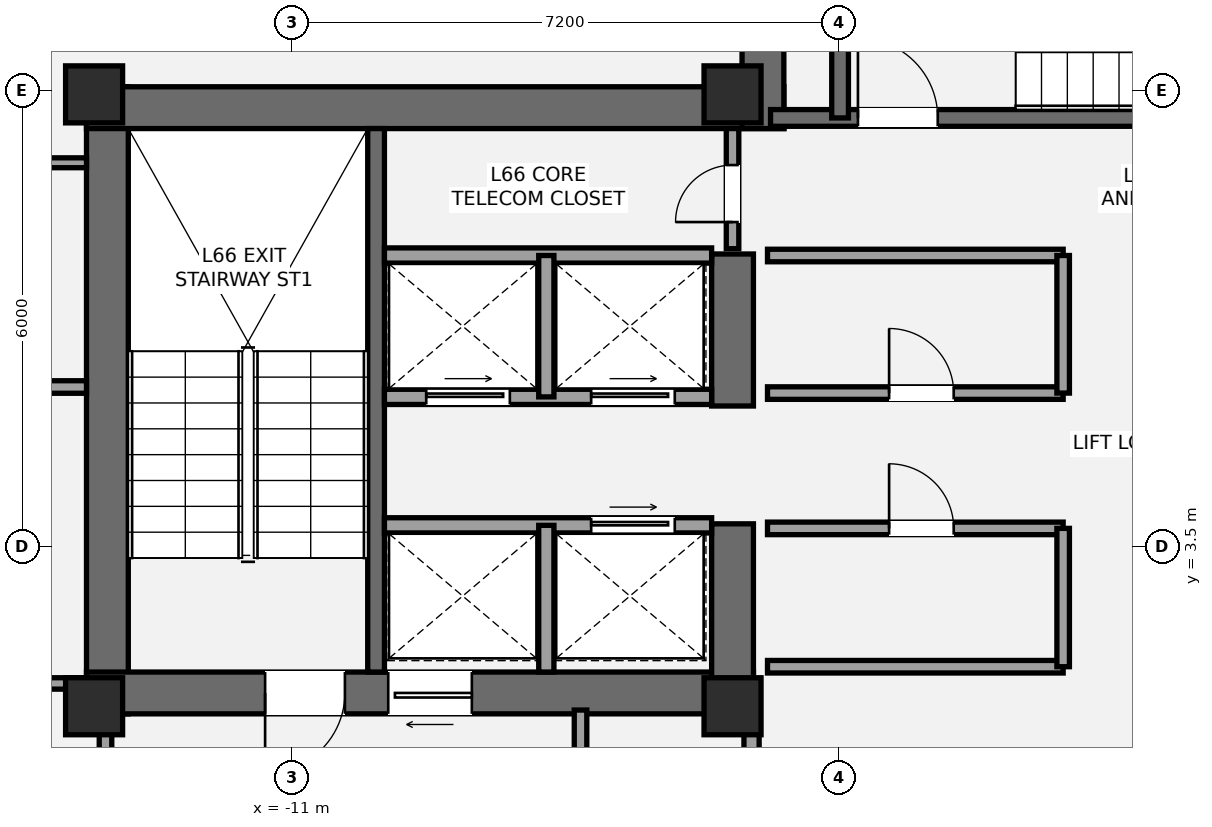
"""IFC4 building model, lengths in metres.
Left out: names, types, materials, properties, quantities, classifications, styles, units other than length and angle.
Written with IfcOpenShell. Run it as: python <this file> out.ifc"""

import sys

from ifc_helpers import new_model, si_unit, direction, frame, frame_2d, origin, origin_2d, place, context, subcontext, project, spatial, rectangle, extrude, element, fill, save


model = new_model("IFC4")
c1 = context("Model", 3, precision=1e-05, world=origin(), true_north=direction((0.0, 1.0)))
c2 = subcontext(c1, "Body", "Model", "MODEL_VIEW")
j1 = project(units=[si_unit("LENGTHUNIT", "METRE"), si_unit("PLANEANGLEUNIT", "RADIAN")], contexts=[c1])
p1 = place(None, origin())
s1 = spatial("IfcSite", under=j1, at=p1, CompositionType="ELEMENT")
p2 = place(p1, origin())
s2 = spatial("IfcBuilding", under=s1, at=p2, CompositionType="ELEMENT")
p3 = place(p2, frame((0.0, 0.0, 235.2)))
s3 = spatial("IfcBuildingStorey", under=s2, at=p3, CompositionType="ELEMENT", Elevation=235.2)
p4 = place(p3, frame((-13.425, 1.3, 0.0), z_axis=(0.0, 0.0, 1.0), x_axis=(0.0, 1.0, 0.0)))
e1 = element("IfcWall", 1, at=p4, inside=s3, PredefinedType="SHEAR", context=c2, shape_type="SweptSolid", body=[
    extrude(rectangle(XDim=8.25, YDim=0.55, at=frame_2d((4.125, 0.0))), origin(), (0.0, 0.0, 1.0), 3.15),
])
p5 = place(p3, frame((-13.7, 9.275, 0.0), z_axis=(0.0, 0.0, 1.0), x_axis=(1.0, 0.0, 0.0)))
e2 = element("IfcWall", 2, at=p5, inside=s3, PredefinedType="SHEAR", context=c2, shape_type="SweptSolid", body=[
    extrude(rectangle(XDim=9.175, YDim=0.55, at=frame_2d((4.587, 0.0))), origin(), (0.0, 0.0, 1.0), 3.15),
])
p6 = place(p3, frame((-4.925, 1.575, 0.0), z_axis=(0.0, 0.0, 1.0), x_axis=(-1.0, 0.0, 0.0)))
e3 = element("IfcWall", 3, at=p6, inside=s3, PredefinedType="SHEAR", context=c2, shape_type="SweptSolid", body=[
    extrude(rectangle(XDim=8.775, YDim=0.55, at=frame_2d((4.387, 0.0))), origin(), (0.0, 0.0, 1.0), 3.15),
])
p7 = place(p6, frame((5.375, 0.0, 0.0)))
e4 = element("IfcOpeningElement", 4, at=p7, cuts=e3, PredefinedType="OPENING", context=c2, shape_type="SweptSolid", body=[
    extrude(rectangle(XDim=1.05, YDim=2.15, at=frame_2d((0.525, 1.075))), frame((0.0, 0.285, 0.0), z_axis=(0.0, -1.0, 0.0), x_axis=(1.0, 0.0, 0.0)), (0.0, 0.0, 1.0), 0.57),
])
p8 = place(p6, frame((3.705, 0.0, 0.0)))
e5 = element("IfcOpeningElement", 5, at=p8, cuts=e3, PredefinedType="OPENING", context=c2, shape_type="SweptSolid", body=[
    extrude(rectangle(XDim=1.1, YDim=2.2, at=frame_2d((0.55, 1.1))), frame((0.0, 0.285, 0.0), z_axis=(0.0, -1.0, 0.0), x_axis=(1.0, 0.0, 0.0)), (0.0, 0.0, 1.0), 0.57),
])
p9 = place(p3, frame((-5.2, 1.3, 0.0), z_axis=(0.0, 0.0, 1.0), x_axis=(0.0, 1.0, 0.0)))
e6 = element("IfcWall", 6, at=p9, inside=s3, PredefinedType="SHEAR", context=c2, shape_type="SweptSolid", body=[
    extrude(rectangle(XDim=2.5, YDim=0.55, at=frame_2d((1.25, 0.0))), origin(), (0.0, 0.0, 1.0), 3.15),
])
p10 = place(p3, frame((-5.2, 5.35, 0.0), z_axis=(0.0, 0.0, 1.0), x_axis=(0.0, 1.0, 0.0)))
e7 = element("IfcWall", 7, at=p10, inside=s3, PredefinedType="SHEAR", context=c2, shape_type="SweptSolid", body=[
    extrude(rectangle(XDim=2.0, YDim=0.55, at=frame_2d((1.0, 0.0))), origin(), (0.0, 0.0, 1.0), 3.15),
])
p11 = place(p3, frame((-9.89, 1.85, 0.0), z_axis=(0.0, 0.0, 1.0), x_axis=(0.0, 1.0, 0.0)))
e8 = element("IfcWall", 8, at=p11, inside=s3, PredefinedType="SHEAR", context=c2, shape_type="SweptSolid", body=[
    extrude(rectangle(XDim=7.15, YDim=0.22, at=frame_2d((3.575, 0.0))), origin(), (0.0, 0.0, 1.0), 3.15),
])
p12 = place(p3, frame((-4.8, 9.0, 0.0), z_axis=(0.0, 0.0, 1.0), x_axis=(0.0, 1.0, 0.0)))
e9 = element("IfcWall", 9, at=p12, inside=s3, PredefinedType="SHEAR", context=c2, shape_type="SweptSolid", body=[
    extrude(rectangle(XDim=3.95, YDim=0.55, at=frame_2d((1.975, 0.0))), origin(), (0.0, 0.0, 1.0), 3.15),
])
p13 = place(p3, frame((-4.7, 9.14, 0.0), z_axis=(0.0, 0.0, 1.0), x_axis=(1.0, 0.0, 0.0)))
e10 = element("IfcWall", 10, at=p13, inside=s3, PredefinedType="SHEAR", context=c2, shape_type="SweptSolid", body=[
    extrude(rectangle(XDim=9.3, YDim=0.22, at=frame_2d((4.65, 0.0))), origin(), (0.0, 0.0, 1.0), 3.15),
])
p14 = place(p13, frame((1.15, 0.0, 0.0)))
e11 = element("IfcOpeningElement", 11, at=p14, cuts=e10, PredefinedType="OPENING", context=c2, shape_type="SweptSolid", body=[
    extrude(rectangle(XDim=1.05, YDim=2.15, at=frame_2d((0.525, 1.075))), frame((0.0, 0.12, 0.0), z_axis=(0.0, -1.0, 0.0), x_axis=(1.0, 0.0, 0.0)), (0.0, 0.0, 1.0), 0.24),
])
p15 = place(p3, frame((-3.785, 9.14, 0.0), z_axis=(0.0, 0.0, 1.0), x_axis=(0.0, 1.0, 0.0)))
e12 = element("IfcWall", 12, at=p15, inside=s3, PredefinedType="SHEAR", context=c2, shape_type="SweptSolid", body=[
    extrude(rectangle(XDim=3.26, YDim=0.22, at=frame_2d((1.63, 0.0))), origin(), (0.0, 0.0, 1.0), 3.15),
])
for number, where, z_axis, x_axis in (
    (13, (-13.6, 1.4, 0.0), (0.0, 0.0, 1.0), (1.0, 0.0, 0.0)),
    (14, (-13.6, 9.45, 0.0), (0.0, 0.0, 1.0), (1.0, 0.0, 0.0)),
    (15, (-5.2, 1.4, 0.0), (0.0, 0.0, 1.0), (1.0, 0.0, 0.0)),
    (16, (-5.2, 9.45, 0.0), (0.0, 0.0, 1.0), (1.0, 0.0, 0.0)),
):
    element("IfcColumn", number, at=place(p3, frame(where, z_axis=z_axis, x_axis=x_axis)), inside=s3, PredefinedType="PILASTER", context=c2, shape_type="SweptSolid", body=[
        extrude(rectangle(XDim=0.75, YDim=0.75, at=origin_2d()), origin(), (0.0, 0.0, 1.0), 3.15),
    ])
p16 = place(p3, frame((-17.381, 9.559, 0.0), z_axis=(0.0, 0.0, 1.0), x_axis=(0.827637036896, 0.561263694851, 0.0)))
e17 = element("IfcWall", 17, at=p16, inside=s3, PredefinedType="STANDARD", context=c2, shape_type="SweptSolid", body=[
    extrude(rectangle(XDim=3.793, YDim=0.44, at=frame_2d((1.896, 0.0))), origin(), (0.0, 0.0, 1.0), 2.336),
])
p17 = place(p16, frame((1.544, 0.0, 0.55)))
e18 = element("IfcOpeningElement", 18, at=p17, cuts=e17, PredefinedType="OPENING", context=c2, shape_type="SweptSolid", body=[
    extrude(rectangle(XDim=1.75, YDim=1.55, at=frame_2d((0.875, 0.775))), frame((0.0, 0.23, 0.0), z_axis=(0.0, -1.0, 0.0), x_axis=(1.0, 0.0, 0.0)), (0.0, 0.0, 1.0), 0.46),
])
p18 = place(p3, frame((-13.45, -2.15, 0.0), z_axis=(0.0, 0.0, 1.0), x_axis=(0.0, 1.0, 0.0)))
e19 = element("IfcWall", 19, at=p18, inside=s3, PredefinedType="PARTITIONING", context=c2, shape_type="SweptSolid", body=[
    extrude(rectangle(XDim=3.5, YDim=0.165, at=frame_2d((1.75, 0.0))), origin(), (0.0, 0.0, 1.0), 2.423),
])
p19 = place(p18, frame((0.67, 0.0, 0.0)))
e20 = element("IfcOpeningElement", 20, at=p19, cuts=e19, PredefinedType="OPENING", context=c2, shape_type="SweptSolid", body=[
    extrude(rectangle(XDim=1.05, YDim=2.15, at=frame_2d((0.525, 1.075))), frame((0.0, 0.093, 0.0), z_axis=(0.0, -1.0, 0.0), x_axis=(1.0, 0.0, 0.0)), (0.0, 0.0, 1.0), 0.185),
])
p20 = place(p3, frame((-7.2, -2.15, 0.0), z_axis=(0.0, 0.0, 1.0), x_axis=(0.0, 1.0, 0.0)))
e21 = element("IfcWall", 21, at=p20, inside=s3, PredefinedType="PARTITIONING", context=c2, shape_type="SweptSolid", body=[
    extrude(rectangle(XDim=3.5, YDim=0.165, at=frame_2d((1.75, 0.0))), origin(), (0.0, 0.0, 1.0), 2.423),
])
p21 = place(p3, frame((-4.95, -2.15, 0.0), z_axis=(0.0, 0.0, 1.0), x_axis=(0.0, 1.0, 0.0)))
e22 = element("IfcWall", 22, at=p21, inside=s3, PredefinedType="SOLIDWALL", context=c2, shape_type="SweptSolid", body=[
    extrude(rectangle(XDim=3.5, YDim=0.2, at=frame_2d((1.75, 0.0))), origin(), (0.0, 0.0, 1.0), 2.423),
])
p22 = place(p21, frame((0.95, 0.0, 0.0)))
e23 = element("IfcOpeningElement", 23, at=p22, cuts=e22, PredefinedType="OPENING", context=c2, shape_type="SweptSolid", body=[
    extrude(rectangle(XDim=0.75, YDim=2.1, at=frame_2d((0.375, 1.05))), frame((0.0, 0.11, 0.0), z_axis=(0.0, -1.0, 0.0), x_axis=(1.0, 0.0, 0.0)), (0.0, 0.0, 1.0), 0.22),
])
p23 = place(p3, frame((-9.78, 3.78, 0.0), z_axis=(0.0, 0.0, 1.0), x_axis=(1.0, 0.0, 0.0)))
e24 = element("IfcWall", 24, at=p23, inside=s3, PredefinedType="SOLIDWALL", context=c2, shape_type="SweptSolid", body=[
    extrude(rectangle(XDim=4.305, YDim=0.2, at=frame_2d((2.152, 0.0))), origin(), (0.0, 0.0, 1.0), 2.97),
])
p24 = place(p23, frame((2.72, 0.0, 0.0)))
e25 = element("IfcOpeningElement", 25, at=p24, cuts=e24, PredefinedType="OPENING", context=c2, shape_type="SweptSolid", body=[
    extrude(rectangle(XDim=1.1, YDim=2.2, at=frame_2d((0.55, 1.1))), frame((0.0, 0.11, 0.0), z_axis=(0.0, -1.0, 0.0), x_axis=(1.0, 0.0, 0.0)), (0.0, 0.0, 1.0), 0.22),
])
p25 = place(p3, frame((-7.65, 1.85, 0.0), z_axis=(0.0, 0.0, 1.0), x_axis=(0.0, 1.0, 0.0)))
e26 = element("IfcWall", 26, at=p25, inside=s3, PredefinedType="SOLIDWALL", context=c2, shape_type="SweptSolid", body=[
    extrude(rectangle(XDim=1.93, YDim=0.2, at=frame_2d((0.965, 0.0))), origin(), (0.0, 0.0, 1.0), 2.97),
])
p26 = place(p3, frame((-9.78, 5.47, 0.0), z_axis=(0.0, 0.0, 1.0), x_axis=(1.0, 0.0, 0.0)))
e27 = element("IfcWall", 27, at=p26, inside=s3, PredefinedType="SOLIDWALL", context=c2, shape_type="SweptSolid", body=[
    extrude(rectangle(XDim=4.305, YDim=0.2, at=frame_2d((2.152, 0.0))), origin(), (0.0, 0.0, 1.0), 2.97),
])
p27 = place(p26, frame((0.55, 0.0, 0.0)))
e28 = element("IfcOpeningElement", 28, at=p27, cuts=e27, PredefinedType="OPENING", context=c2, shape_type="SweptSolid", body=[
    extrude(rectangle(XDim=1.1, YDim=2.2, at=frame_2d((0.55, 1.1))), frame((0.0, 0.11, 0.0), z_axis=(0.0, -1.0, 0.0), x_axis=(1.0, 0.0, 0.0)), (0.0, 0.0, 1.0), 0.22),
])
p28 = place(p26, frame((2.72, 0.0, 0.0)))
e29 = element("IfcOpeningElement", 29, at=p28, cuts=e27, PredefinedType="OPENING", context=c2, shape_type="SweptSolid", body=[
    extrude(rectangle(XDim=1.1, YDim=2.2, at=frame_2d((0.55, 1.1))), frame((0.0, 0.11, 0.0), z_axis=(0.0, -1.0, 0.0), x_axis=(1.0, 0.0, 0.0)), (0.0, 0.0, 1.0), 0.22),
])
p29 = place(p3, frame((-9.78, 7.33, 0.0), z_axis=(0.0, 0.0, 1.0), x_axis=(1.0, 0.0, 0.0)))
e30 = element("IfcWall", 30, at=p29, inside=s3, PredefinedType="SOLIDWALL", context=c2, shape_type="SweptSolid", body=[
    extrude(rectangle(XDim=4.305, YDim=0.2, at=frame_2d((2.152, 0.0))), origin(), (0.0, 0.0, 1.0), 2.97),
])
p30 = place(p3, frame((-7.65, 5.47, 0.0), z_axis=(0.0, 0.0, 1.0), x_axis=(0.0, 1.0, 0.0)))
e31 = element("IfcWall", 31, at=p30, inside=s3, PredefinedType="SOLIDWALL", context=c2, shape_type="SweptSolid", body=[
    extrude(rectangle(XDim=1.86, YDim=0.2, at=frame_2d((0.93, 0.0))), origin(), (0.0, 0.0, 1.0), 2.97),
])
p31 = place(p3, frame((-4.74, 1.92, 0.0), z_axis=(0.0, 0.0, 1.0), x_axis=(1.0, 0.0, 0.0)))
e32 = element("IfcWall", 32, at=p31, inside=s3, PredefinedType="PARTITIONING", context=c2, shape_type="SweptSolid", body=[
    extrude(rectangle(XDim=3.89, YDim=0.165, at=frame_2d((1.945, 0.0))), origin(), (0.0, 0.0, 1.0), 2.11),
])
p32 = place(p3, frame((-4.74, 3.74, 0.0), z_axis=(0.0, 0.0, 1.0), x_axis=(1.0, 0.0, 0.0)))
e33 = element("IfcWall", 33, at=p32, inside=s3, PredefinedType="PARTITIONING", context=c2, shape_type="SweptSolid", body=[
    extrude(rectangle(XDim=3.89, YDim=0.165, at=frame_2d((1.945, 0.0))), origin(), (0.0, 0.0, 1.0), 2.97),
])
p33 = place(p32, frame((1.6, 0.0, 0.0)))
e34 = element("IfcOpeningElement", 34, at=p33, cuts=e33, PredefinedType="OPENING", context=c2, shape_type="SweptSolid", body=[
    extrude(rectangle(XDim=0.85, YDim=2.1, at=frame_2d((0.425, 1.05))), frame((0.0, 0.093, 0.0), z_axis=(0.0, -1.0, 0.0), x_axis=(1.0, 0.0, 0.0)), (0.0, 0.0, 1.0), 0.185),
])
p34 = place(p3, frame((-0.85, 1.92, 0.0), z_axis=(0.0, 0.0, 1.0), x_axis=(0.0, 1.0, 0.0)))
e35 = element("IfcWall", 35, at=p34, inside=s3, PredefinedType="PARTITIONING", context=c2, shape_type="SweptSolid", body=[
    extrude(rectangle(XDim=1.82, YDim=0.165, at=frame_2d((0.91, 0.0))), origin(), (0.0, 0.0, 1.0), 2.97),
])
p35 = place(p3, frame((-4.74, 5.52, 0.0), z_axis=(0.0, 0.0, 1.0), x_axis=(1.0, 0.0, 0.0)))
e36 = element("IfcWall", 36, at=p35, inside=s3, PredefinedType="PARTITIONING", context=c2, shape_type="SweptSolid", body=[
    extrude(rectangle(XDim=3.89, YDim=0.165, at=frame_2d((1.945, 0.0))), origin(), (0.0, 0.0, 1.0), 2.97),
])
p36 = place(p35, frame((1.6, 0.0, 0.0)))
e37 = element("IfcOpeningElement", 37, at=p36, cuts=e36, PredefinedType="OPENING", context=c2, shape_type="SweptSolid", body=[
    extrude(rectangle(XDim=0.85, YDim=2.1, at=frame_2d((0.425, 1.05))), frame((0.0, 0.093, 0.0), z_axis=(0.0, -1.0, 0.0), x_axis=(1.0, 0.0, 0.0)), (0.0, 0.0, 1.0), 0.185),
])
p37 = place(p3, frame((-4.74, 7.33, 0.0), z_axis=(0.0, 0.0, 1.0), x_axis=(1.0, 0.0, 0.0)))
e38 = element("IfcWall", 38, at=p37, inside=s3, PredefinedType="PARTITIONING", context=c2, shape_type="SweptSolid", body=[
    extrude(rectangle(XDim=3.89, YDim=0.165, at=frame_2d((1.945, 0.0))), origin(), (0.0, 0.0, 1.0), 2.97),
])
p38 = place(p3, frame((-0.85, 5.52, 0.0), z_axis=(0.0, 0.0, 1.0), x_axis=(0.0, 1.0, 0.0)))
e39 = element("IfcWall", 39, at=p38, inside=s3, PredefinedType="PARTITIONING", context=c2, shape_type="SweptSolid", body=[
    extrude(rectangle(XDim=1.81, YDim=0.165, at=frame_2d((0.905, 0.0))), origin(), (0.0, 0.0, 1.0), 2.97),
])
p39 = place(p3, frame((-5.2, 7.42, 0.0), z_axis=(0.0, 0.0, 1.0), x_axis=(0.0, 1.0, 0.0)))
e40 = element("IfcWall", 40, at=p39, inside=s3, PredefinedType="PARTITIONING", context=c2, shape_type="SweptSolid", body=[
    extrude(rectangle(XDim=1.58, YDim=0.165, at=frame_2d((0.79, 0.0))), origin(), (0.0, 0.0, 1.0), 2.97),
])
p40 = place(p39, frame((0.35, 0.0, 0.0)))
e41 = element("IfcOpeningElement", 41, at=p40, cuts=e40, PredefinedType="OPENING", context=c2, shape_type="SweptSolid", body=[
    extrude(rectangle(XDim=0.75, YDim=2.1, at=frame_2d((0.375, 1.05))), frame((0.0, 0.093, 0.0), z_axis=(0.0, -1.0, 0.0), x_axis=(1.0, 0.0, 0.0)), (0.0, 0.0, 1.0), 0.185),
])
p41 = place(p3, frame((-20.06, 5.6, 0.0), z_axis=(0.0, 0.0, 1.0), x_axis=(1.0, 0.0, 0.0)))
e42 = element("IfcWall", 42, at=p41, inside=s3, PredefinedType="PARTITIONING", context=c2, shape_type="SweptSolid", body=[
    extrude(rectangle(XDim=6.36, YDim=0.165, at=frame_2d((3.18, 0.0))), origin(), (0.0, 0.0, 1.0), 2.423),
])
p42 = place(p41, frame((2.309, 0.0, 0.0)))
e43 = element("IfcOpeningElement", 43, at=p42, cuts=e42, PredefinedType="OPENING", context=c2, shape_type="SweptSolid", body=[
    extrude(rectangle(XDim=0.85, YDim=2.1, at=frame_2d((0.425, 1.05))), frame((0.0, 0.093, 0.0), z_axis=(0.0, -1.0, 0.0), x_axis=(1.0, 0.0, 0.0)), (0.0, 0.0, 1.0), 0.185),
])
p43 = place(p3, frame((-17.95, 1.7, 0.0), z_axis=(0.0, 0.0, 1.0), x_axis=(1.0, 0.0, 0.0)))
e44 = element("IfcWall", 44, at=p43, inside=s3, PredefinedType="PLUMBINGWALL", context=c2, shape_type="SweptSolid", body=[
    extrude(rectangle(XDim=4.25, YDim=0.15, at=frame_2d((2.125, 0.0))), origin(), (0.0, 0.0, 1.0), 2.423),
])
p44 = place(p43, frame((2.85, 0.0, 0.0)))
e45 = element("IfcOpeningElement", 45, at=p44, cuts=e44, PredefinedType="OPENING", context=c2, shape_type="SweptSolid", body=[
    extrude(rectangle(XDim=0.8, YDim=2.1, at=frame_2d((0.4, 1.05))), frame((0.0, 0.085, 0.0), z_axis=(0.0, -1.0, 0.0), x_axis=(1.0, 0.0, 0.0)), (0.0, 0.0, 1.0), 0.17),
])
p45 = place(p43, frame((1.27, 0.0, 0.0)))
e46 = element("IfcOpeningElement", 46, at=p45, cuts=e44, PredefinedType="OPENING", context=c2, shape_type="SweptSolid", body=[
    extrude(rectangle(XDim=0.85, YDim=2.1, at=frame_2d((0.425, 1.05))), frame((0.0, 0.085, 0.0), z_axis=(0.0, -1.0, 0.0), x_axis=(1.0, 0.0, 0.0)), (0.0, 0.0, 1.0), 0.17),
])
p46 = place(p3, frame((-17.958, 8.55, 0.0), z_axis=(0.0, 0.0, 1.0), x_axis=(1.0, 0.0, 0.0)))
e47 = element("IfcWall", 47, at=p46, inside=s3, PredefinedType="PARTITIONING", context=c2, shape_type="SweptSolid", body=[
    extrude(rectangle(XDim=4.258, YDim=0.13, at=frame_2d((2.129, 0.0))), origin(), (0.0, 0.0, 1.0), 2.423),
])
p47 = place(p46, frame((1.302, 0.0, 0.0)))
e48 = element("IfcOpeningElement", 48, at=p47, cuts=e47, PredefinedType="OPENING", context=c2, shape_type="SweptSolid", body=[
    extrude(rectangle(XDim=0.85, YDim=2.1, at=frame_2d((0.425, 1.05))), frame((0.0, 0.075, 0.0), z_axis=(0.0, -1.0, 0.0), x_axis=(1.0, 0.0, 0.0)), (0.0, 0.0, 1.0), 0.15),
])
p48 = place(p7, origin())
e49 = element("IfcDoor", 49, at=p48, inside=s3, OperationType="SINGLE_SWING_RIGHT", PredefinedType="DOOR", context=c2, shape_type="SweptSolid", body=[
    extrude(rectangle(XDim=1.05, YDim=2.15, at=frame_2d((0.525, 1.075))), frame((0.0, 0.025, 0.0), z_axis=(0.0, -1.0, 0.0), x_axis=(1.0, 0.0, 0.0)), (0.0, 0.0, 1.0), 0.05),
])
fill(e4, e49)
p49 = place(p14, origin())
e50 = element("IfcDoor", 50, at=p49, inside=s3, OperationType="SINGLE_SWING_LEFT", PredefinedType="DOOR", context=c2, shape_type="SweptSolid", body=[
    extrude(rectangle(XDim=1.05, YDim=2.15, at=frame_2d((0.525, 1.075))), frame((0.0, 0.025, 0.0), z_axis=(0.0, -1.0, 0.0), x_axis=(1.0, 0.0, 0.0)), (0.0, 0.0, 1.0), 0.05),
])
fill(e11, e50)
p50 = place(p8, origin())
e51 = element("IfcDoor", 51, at=p50, inside=s3, OperationType="SLIDING_TO_LEFT", PredefinedType="DOOR", context=c2, shape_type="SweptSolid", body=[
    extrude(rectangle(XDim=1.1, YDim=2.2, at=frame_2d((0.55, 1.1))), frame((0.0, 0.025, 0.0), z_axis=(0.0, -1.0, 0.0), x_axis=(1.0, 0.0, 0.0)), (0.0, 0.0, 1.0), 0.05),
])
fill(e5, e51)
p51 = place(p27, origin())
e52 = element("IfcDoor", 52, at=p51, inside=s3, OperationType="SLIDING_TO_LEFT", PredefinedType="DOOR", context=c2, shape_type="SweptSolid", body=[
    extrude(rectangle(XDim=1.1, YDim=2.2, at=frame_2d((0.55, 1.1))), frame((0.0, 0.025, 0.0), z_axis=(0.0, -1.0, 0.0), x_axis=(1.0, 0.0, 0.0)), (0.0, 0.0, 1.0), 0.05),
])
fill(e28, e52)
p52 = place(p28, origin())
e53 = element("IfcDoor", 53, at=p52, inside=s3, OperationType="SLIDING_TO_LEFT", PredefinedType="DOOR", context=c2, shape_type="SweptSolid", body=[
    extrude(rectangle(XDim=1.1, YDim=2.2, at=frame_2d((0.55, 1.1))), frame((0.0, 0.025, 0.0), z_axis=(0.0, -1.0, 0.0), x_axis=(1.0, 0.0, 0.0)), (0.0, 0.0, 1.0), 0.05),
])
fill(e29, e53)
p53 = place(p24, origin())
e54 = element("IfcDoor", 54, at=p53, inside=s3, OperationType="SLIDING_TO_LEFT", PredefinedType="DOOR", context=c2, shape_type="SweptSolid", body=[
    extrude(rectangle(XDim=1.1, YDim=2.2, at=frame_2d((0.55, 1.1))), frame((0.0, 0.025, 0.0), z_axis=(0.0, -1.0, 0.0), x_axis=(1.0, 0.0, 0.0)), (0.0, 0.0, 1.0), 0.05),
])
fill(e25, e54)
p54 = place(p33, origin())
e55 = element("IfcDoor", 55, at=p54, inside=s3, OperationType="SINGLE_SWING_LEFT", PredefinedType="DOOR", context=c2, shape_type="SweptSolid", body=[
    extrude(rectangle(XDim=0.85, YDim=2.1, at=frame_2d((0.425, 1.05))), frame((0.0, 0.025, 0.0), z_axis=(0.0, -1.0, 0.0), x_axis=(1.0, 0.0, 0.0)), (0.0, 0.0, 1.0), 0.05),
])
fill(e34, e55)
p55 = place(p36, origin())
e56 = element("IfcDoor", 56, at=p55, inside=s3, OperationType="SINGLE_SWING_LEFT", PredefinedType="DOOR", context=c2, shape_type="SweptSolid", body=[
    extrude(rectangle(XDim=0.85, YDim=2.1, at=frame_2d((0.425, 1.05))), frame((0.0, 0.025, 0.0), z_axis=(0.0, -1.0, 0.0), x_axis=(1.0, 0.0, 0.0)), (0.0, 0.0, 1.0), 0.05),
])
fill(e37, e56)
p56 = place(p40, origin())
e57 = element("IfcDoor", 57, at=p56, inside=s3, OperationType="SINGLE_SWING_LEFT", PredefinedType="DOOR", context=c2, shape_type="SweptSolid", body=[
    extrude(rectangle(XDim=0.75, YDim=2.1, at=frame_2d((0.375, 1.05))), frame((0.0, 0.025, 0.0), z_axis=(0.0, -1.0, 0.0), x_axis=(1.0, 0.0, 0.0)), (0.0, 0.0, 1.0), 0.05),
])
fill(e41, e57)
save(model, sys.argv[1])
